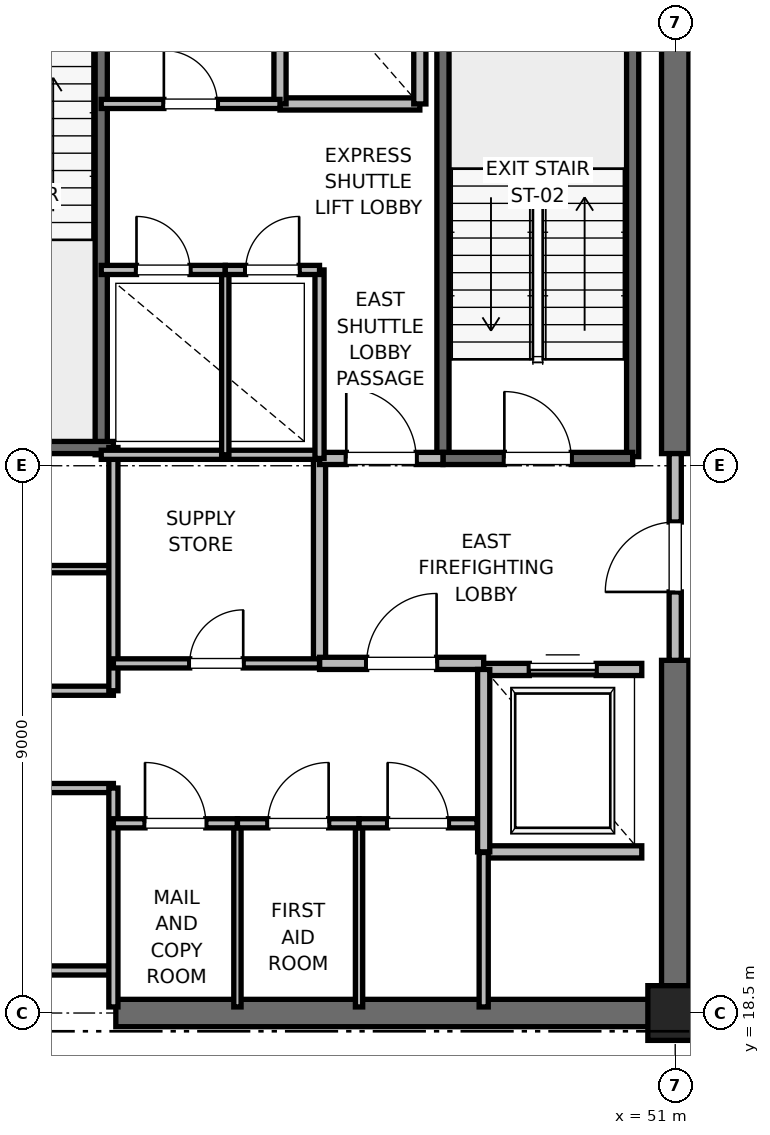
"""IFC4 building model, lengths in metres.
Left out: names, types, materials, properties, quantities, classifications, styles, units other than length and angle.
Written with IfcOpenShell. Run it as: python <this file> out.ifc"""

import sys

from ifc_helpers import new_model, si_unit, direction, frame, frame_2d, origin, origin_2d, place, context, subcontext, project, spatial, rectangle, extrude, element, fill, save


model = new_model("IFC4")
c1 = context("Model", 3, precision=1e-05, world=origin(), true_north=direction((0.0, 1.0)))
c2 = subcontext(c1, "Body", "Model", "MODEL_VIEW")
j1 = project(units=[si_unit("LENGTHUNIT", "METRE"), si_unit("PLANEANGLEUNIT", "RADIAN")], contexts=[c1])
p1 = place(None, origin())
s1 = spatial("IfcSite", under=j1, at=p1, CompositionType="ELEMENT")
p2 = place(p1, origin())
s2 = spatial("IfcBuilding", under=s1, at=p2, CompositionType="ELEMENT")
p3 = place(p2, frame((0.0, 0.0, 283.2)))
s3 = spatial("IfcBuildingStorey", under=s2, at=p3, CompositionType="ELEMENT", Elevation=283.2)
p4 = place(p3, frame((51.0, 18.5, 0.0), z_axis=(0.0, 0.0, 1.0), x_axis=(1.0, 0.0, 0.0)))
e1 = element("IfcColumn", 1, at=p4, inside=s3, PredefinedType="PILASTER", context=c2, shape_type="SweptSolid", body=[
    extrude(rectangle(XDim=0.9, YDim=0.9, at=origin_2d()), origin(), (0.0, 0.0, 1.0), 4.0),
])
p5 = place(p3, frame((41.8, 18.5, 0.0), z_axis=(0.0, 0.0, 1.0), x_axis=(1.0, 0.0, 0.0)))
e2 = element("IfcWall", 2, at=p5, inside=s3, PredefinedType="SHEAR", context=c2, shape_type="SweptSolid", body=[
    extrude(rectangle(XDim=9.2, YDim=0.45, at=frame_2d((4.6, 0.0))), origin(), (0.0, 0.0, 1.0), 3.785),
])
p6 = place(p3, frame((51.0, 18.5, 0.0), z_axis=(0.0, 0.0, 1.0), x_axis=(0.0, 1.0, 0.0)))
e3 = element("IfcWall", 3, at=p6, inside=s3, PredefinedType="SHEAR", context=c2, shape_type="SweptSolid", body=[
    extrude(rectangle(XDim=5.8, YDim=0.45, at=frame_2d((2.9, 0.0))), origin(), (0.0, 0.0, 1.0), 3.785),
])
p7 = place(p3, frame((51.0, 27.7, 0.0), z_axis=(0.0, 0.0, 1.0), x_axis=(0.0, 1.0, 0.0)))
e4 = element("IfcWall", 4, at=p7, inside=s3, PredefinedType="SHEAR", context=c2, shape_type="SweptSolid", body=[
    extrude(rectangle(XDim=8.8, YDim=0.45, at=frame_2d((4.4, 0.0))), origin(), (0.0, 0.0, 1.0), 3.785),
])
p8 = place(p3, frame((50.3, 27.65, 0.0), z_axis=(0.0, 0.0, 1.0), x_axis=(0.0, 1.0, 0.0)))
e5 = element("IfcWall", 5, at=p8, inside=s3, PredefinedType="SOLIDWALL", context=c2, shape_type="SweptSolid", body=[
    extrude(rectangle(XDim=8.15, YDim=0.2, at=frame_2d((4.075, 0.0))), origin(), (0.0, 0.0, 1.0), 3.785),
])
p9 = place(p3, frame((47.18, 27.62, 0.0), z_axis=(0.0, 0.0, 1.0), x_axis=(0.0, 1.0, 0.0)))
e6 = element("IfcWall", 6, at=p9, inside=s3, PredefinedType="SOLIDWALL", context=c2, shape_type="SweptSolid", body=[
    extrude(rectangle(XDim=8.18, YDim=0.2, at=frame_2d((4.09, 0.0))), origin(), (0.0, 0.0, 1.0), 3.785),
])
p10 = place(p3, frame((47.18, 27.62, 0.0), z_axis=(0.0, 0.0, 1.0), x_axis=(1.0, 0.0, 0.0)))
e7 = element("IfcWall", 7, at=p10, inside=s3, PredefinedType="SOLIDWALL", context=c2, shape_type="SweptSolid", body=[
    extrude(rectangle(XDim=3.12, YDim=0.2, at=frame_2d((1.56, 0.0))), origin(), (0.0, 0.0, 1.0), 3.785),
])
p11 = place(p10, frame((1.01, 0.0, 0.0)))
e8 = element("IfcOpeningElement", 8, at=p11, cuts=e7, PredefinedType="OPENING", context=c2, shape_type="SweptSolid", body=[
    extrude(rectangle(XDim=1.1, YDim=2.15, at=frame_2d((0.55, 1.075))), frame((0.0, 0.1, 0.0), z_axis=(0.0, -1.0, 0.0), x_axis=(1.0, 0.0, 0.0)), (0.0, 0.0, 1.0), 0.2),
])
p12 = place(p3, frame((41.56, 27.68, 0.0), z_axis=(0.0, 0.0, 1.0), x_axis=(0.0, 1.0, 0.0)))
e9 = element("IfcWall", 9, at=p12, inside=s3, PredefinedType="SOLIDWALL", context=c2, shape_type="SweptSolid", body=[
    extrude(rectangle(XDim=8.57, YDim=0.2, at=frame_2d((4.285, 0.0))), origin(), (0.0, 0.0, 1.0), 3.785),
])
p13 = place(p3, frame((38.44, 27.8, 0.0), z_axis=(0.0, 0.0, 1.0), x_axis=(1.0, 0.0, 0.0)))
e10 = element("IfcWall", 10, at=p13, inside=s3, PredefinedType="SOLIDWALL", context=c2, shape_type="SweptSolid", body=[
    extrude(rectangle(XDim=3.32, YDim=0.2, at=frame_2d((1.66, 0.0))), origin(), (0.0, 0.0, 1.0), 3.785),
])
p14 = place(p3, frame((45.15, 24.25, 0.0), z_axis=(0.0, 0.0, 1.0), x_axis=(0.0, 1.0, 0.0)))
e11 = element("IfcWall", 11, at=p14, inside=s3, PredefinedType="PARTITIONING", context=c2, shape_type="SweptSolid", body=[
    extrude(rectangle(XDim=3.37, YDim=0.2, at=frame_2d((1.685, 0.0))), origin(), (0.0, 0.0, 1.0), 3.785),
])
p15 = place(p3, frame((45.15, 24.25, 0.0), z_axis=(0.0, 0.0, 1.0), x_axis=(1.0, 0.0, 0.0)))
e12 = element("IfcWall", 12, at=p15, inside=s3, PredefinedType="PARTITIONING", context=c2, shape_type="SweptSolid", body=[
    extrude(rectangle(XDim=2.7, YDim=0.2, at=frame_2d((1.35, 0.0))), origin(), (0.0, 0.0, 1.0), 3.785),
])
p16 = place(p15, frame((0.775, 0.0, 0.0)))
e13 = element("IfcOpeningElement", 13, at=p16, cuts=e12, PredefinedType="OPENING", context=c2, shape_type="SweptSolid", body=[
    extrude(rectangle(XDim=1.15, YDim=2.2, at=frame_2d((0.575, 1.1))), frame((0.0, 0.1, 0.0), z_axis=(0.0, -1.0, 0.0), x_axis=(1.0, 0.0, 0.0)), (0.0, 0.0, 1.0), 0.2),
])
p17 = place(p3, frame((45.15, 27.62, 0.0), z_axis=(0.0, 0.0, 1.0), x_axis=(1.0, 0.0, 0.0)))
e14 = element("IfcWall", 14, at=p17, inside=s3, PredefinedType="PARTITIONING", context=c2, shape_type="SweptSolid", body=[
    extrude(rectangle(XDim=2.03, YDim=0.2, at=frame_2d((1.015, 0.0))), origin(), (0.0, 0.0, 1.0), 3.785),
])
p18 = place(p17, frame((0.44, 0.0, 0.0)))
e15 = element("IfcOpeningElement", 15, at=p18, cuts=e14, PredefinedType="OPENING", context=c2, shape_type="SweptSolid", body=[
    extrude(rectangle(XDim=1.15, YDim=2.2, at=frame_2d((0.575, 1.1))), frame((0.0, 0.1, 0.0), z_axis=(0.0, -1.0, 0.0), x_axis=(1.0, 0.0, 0.0)), (0.0, 0.0, 1.0), 0.2),
])
p19 = place(p3, frame((51.0, 24.3, 0.0), z_axis=(0.0, 0.0, 1.0), x_axis=(0.0, 1.0, 0.0)))
e16 = element("IfcWall", 16, at=p19, inside=s3, PredefinedType="PARTITIONING", context=c2, shape_type="SweptSolid", body=[
    extrude(rectangle(XDim=3.4, YDim=0.2, at=frame_2d((1.7, 0.0))), origin(), (0.0, 0.0, 1.0), 2.865),
])
p20 = place(p19, frame((1.125, 0.0, 0.0)))
e17 = element("IfcOpeningElement", 17, at=p20, cuts=e16, PredefinedType="OPENING", context=c2, shape_type="SweptSolid", body=[
    extrude(rectangle(XDim=1.15, YDim=2.2, at=frame_2d((0.575, 1.1))), frame((0.0, 0.1, 0.0), z_axis=(0.0, -1.0, 0.0), x_axis=(1.0, 0.0, 0.0)), (0.0, 0.0, 1.0), 0.2),
])
p21 = place(p3, frame((47.85, 21.15, 0.0), z_axis=(0.0, 0.0, 1.0), x_axis=(1.0, 0.0, 0.0)))
e18 = element("IfcWall", 18, at=p21, inside=s3, PredefinedType="SOLIDWALL", context=c2, shape_type="SweptSolid", body=[
    extrude(rectangle(XDim=2.6, YDim=0.2, at=frame_2d((1.3, 0.0))), origin(), (0.0, 0.0, 1.0), 3.785),
])
p22 = place(p3, frame((50.45, 24.15, 0.0), z_axis=(0.0, 0.0, 1.0), x_axis=(-1.0, 0.0, 0.0)))
e19 = element("IfcWall", 19, at=p22, inside=s3, PredefinedType="SOLIDWALL", context=c2, shape_type="SweptSolid", body=[
    extrude(rectangle(XDim=2.6, YDim=0.2, at=frame_2d((1.3, 0.0))), origin(), (0.0, 0.0, 1.0), 2.865),
])
p23 = place(p22, frame((0.75, 0.0, 0.0)))
e20 = element("IfcOpeningElement", 20, at=p23, cuts=e19, PredefinedType="OPENING", context=c2, shape_type="SweptSolid", body=[
    extrude(rectangle(XDim=1.1, YDim=2.2, at=frame_2d((0.55, 1.1))), frame((0.0, 0.1, 0.0), z_axis=(0.0, -1.0, 0.0), x_axis=(1.0, 0.0, 0.0)), (0.0, 0.0, 1.0), 0.2),
])
p24 = place(p3, frame((47.85, 24.15, 0.0), z_axis=(0.0, 0.0, 1.0), x_axis=(0.0, -1.0, 0.0)))
e21 = element("IfcWall", 21, at=p24, inside=s3, PredefinedType="SOLIDWALL", context=c2, shape_type="SweptSolid", body=[
    extrude(rectangle(XDim=3.0, YDim=0.2, at=frame_2d((1.5, 0.0))), origin(), (0.0, 0.0, 1.0), 3.785),
])
p25 = place(p3, frame((44.5, 33.45, 0.0), z_axis=(0.0, 0.0, 1.0), x_axis=(1.0, 0.0, 0.0)))
e22 = element("IfcWall", 22, at=p25, inside=s3, PredefinedType="SOLIDWALL", context=c2, shape_type="SweptSolid", body=[
    extrude(rectangle(XDim=2.3, YDim=0.2, at=frame_2d((1.15, 0.0))), origin(), (0.0, 0.0, 1.0), 3.785),
])
p26 = place(p3, frame((44.5, 36.05, 0.0), z_axis=(0.0, 0.0, 1.0), x_axis=(0.0, -1.0, 0.0)))
e23 = element("IfcWall", 23, at=p26, inside=s3, PredefinedType="SOLIDWALL", context=c2, shape_type="SweptSolid", body=[
    extrude(rectangle(XDim=2.6, YDim=0.2, at=frame_2d((1.3, 0.0))), origin(), (0.0, 0.0, 1.0), 2.865),
])
p27 = place(p3, frame((46.8, 33.45, 0.0), z_axis=(0.0, 0.0, 1.0), x_axis=(0.0, 1.0, 0.0)))
e24 = element("IfcWall", 24, at=p27, inside=s3, PredefinedType="SOLIDWALL", context=c2, shape_type="SweptSolid", body=[
    extrude(rectangle(XDim=2.6, YDim=0.2, at=frame_2d((1.3, 0.0))), origin(), (0.0, 0.0, 1.0), 3.785),
])
for number, where, z_axis, x_axis in (
    (25, (39.95, 19.2, 0.0), (0.0, 0.0, 1.0), (1.0, 0.0, 0.0)),
    (26, (39.95, 22.2, 0.0), (0.0, 0.0, 1.0), (1.0, 0.0, 0.0)),
    (27, (39.95, 23.8, 0.0), (0.0, 0.0, 1.0), (1.0, 0.0, 0.0)),
):
    element("IfcWall", number, at=place(p3, frame(where, z_axis=z_axis, x_axis=x_axis)), inside=s3, PredefinedType="PARTITIONING", context=c2, shape_type="SweptSolid", body=[
        extrude(rectangle(XDim=1.81, YDim=0.15, at=frame_2d((0.905, 0.0))), origin(), (0.0, 0.0, 1.0), 2.85),
    ])
p28 = place(p3, frame((39.95, 25.8, 0.0), z_axis=(0.0, 0.0, 1.0), x_axis=(1.0, 0.0, 0.0)))
e28 = element("IfcWall", 28, at=p28, inside=s3, PredefinedType="PARTITIONING", context=c2, shape_type="SweptSolid", body=[
    extrude(rectangle(XDim=1.81, YDim=0.12, at=frame_2d((0.905, 0.0))), origin(), (0.0, 0.0, 1.0), 2.85),
])
p29 = place(p3, frame((41.76, 18.6, 0.0), z_axis=(0.0, 0.0, 1.0), x_axis=(0.0, 1.0, 0.0)))
e29 = element("IfcWall", 29, at=p29, inside=s3, PredefinedType="PARTITIONING", context=c2, shape_type="SweptSolid", body=[
    extrude(rectangle(XDim=3.6, YDim=0.15, at=frame_2d((1.8, 0.0))), origin(), (0.0, 0.0, 1.0), 2.85),
])
p30 = place(p3, frame((41.76, 23.8, 0.0), z_axis=(0.0, 0.0, 1.0), x_axis=(0.0, 1.0, 0.0)))
e30 = element("IfcWall", 30, at=p30, inside=s3, PredefinedType="PARTITIONING", context=c2, shape_type="SweptSolid", body=[
    extrude(rectangle(XDim=4.0, YDim=0.15, at=frame_2d((2.0, 0.0))), origin(), (0.0, 0.0, 1.0), 2.85),
])
p31 = place(p3, frame((41.56, 27.68, 0.0), z_axis=(0.0, 0.0, 1.0), x_axis=(1.0, 0.0, 0.0)))
e31 = element("IfcWall", 31, at=p31, inside=s3, PredefinedType="PARTITIONING", context=c2, shape_type="SweptSolid", body=[
    extrude(rectangle(XDim=3.59, YDim=0.15, at=frame_2d((1.795, 0.0))), origin(), (0.0, 0.0, 1.0), 2.85),
])
p32 = place(p3, frame((47.85, 18.6, 0.0), z_axis=(0.0, 0.0, 1.0), x_axis=(0.0, 1.0, 0.0)))
e32 = element("IfcWall", 32, at=p32, inside=s3, PredefinedType="PARTITIONING", context=c2, shape_type="SweptSolid", body=[
    extrude(rectangle(XDim=2.54, YDim=0.15, at=frame_2d((1.27, 0.0))), origin(), (0.0, 0.0, 1.0), 2.85),
])
for number, where, z_axis, x_axis in (
    (33, (43.8, 18.6, 0.0), (0.0, 0.0, 1.0), (0.0, 1.0, 0.0)),
    (34, (45.8, 18.6, 0.0), (0.0, 0.0, 1.0), (0.0, 1.0, 0.0)),
):
    element("IfcWall", number, at=place(p3, frame(where, z_axis=z_axis, x_axis=x_axis)), inside=s3, PredefinedType="PARTITIONING", context=c2, shape_type="SweptSolid", body=[
        extrude(rectangle(XDim=3.02, YDim=0.12, at=frame_2d((1.51, 0.0))), origin(), (0.0, 0.0, 1.0), 2.85),
    ])
p33 = place(p3, frame((41.76, 21.62, 0.0), z_axis=(0.0, 0.0, 1.0), x_axis=(1.0, 0.0, 0.0)))
e35 = element("IfcWall", 35, at=p33, inside=s3, PredefinedType="PARTITIONING", context=c2, shape_type="SweptSolid", body=[
    extrude(rectangle(XDim=2.04, YDim=0.15, at=frame_2d((1.02, 0.0))), origin(), (0.0, 0.0, 1.0), 2.85),
])
p34 = place(p33, frame((0.52, 0.0, 0.0)))
e36 = element("IfcOpeningElement", 36, at=p34, cuts=e35, PredefinedType="OPENING", context=c2, shape_type="SweptSolid", body=[
    extrude(rectangle(XDim=1.0, YDim=2.15, at=frame_2d((0.5, 1.075))), frame((0.0, 0.075, 0.0), z_axis=(0.0, -1.0, 0.0), x_axis=(1.0, 0.0, 0.0)), (0.0, 0.0, 1.0), 0.15),
])
p35 = place(p3, frame((43.8, 21.62, 0.0), z_axis=(0.0, 0.0, 1.0), x_axis=(1.0, 0.0, 0.0)))
e37 = element("IfcWall", 37, at=p35, inside=s3, PredefinedType="PARTITIONING", context=c2, shape_type="SweptSolid", body=[
    extrude(rectangle(XDim=2.0, YDim=0.15, at=frame_2d((1.0, 0.0))), origin(), (0.0, 0.0, 1.0), 2.85),
])
p36 = place(p35, frame((0.5, 0.0, 0.0)))
e38 = element("IfcOpeningElement", 38, at=p36, cuts=e37, PredefinedType="OPENING", context=c2, shape_type="SweptSolid", body=[
    extrude(rectangle(XDim=1.0, YDim=2.15, at=frame_2d((0.5, 1.075))), frame((0.0, 0.075, 0.0), z_axis=(0.0, -1.0, 0.0), x_axis=(1.0, 0.0, 0.0)), (0.0, 0.0, 1.0), 0.15),
])
p37 = place(p3, frame((45.8, 21.62, 0.0), z_axis=(0.0, 0.0, 1.0), x_axis=(1.0, 0.0, 0.0)))
e39 = element("IfcWall", 39, at=p37, inside=s3, PredefinedType="PARTITIONING", context=c2, shape_type="SweptSolid", body=[
    extrude(rectangle(XDim=1.94, YDim=0.15, at=frame_2d((0.97, 0.0))), origin(), (0.0, 0.0, 1.0), 2.85),
])
p38 = place(p37, frame((0.47, 0.0, 0.0)))
e40 = element("IfcOpeningElement", 40, at=p38, cuts=e39, PredefinedType="OPENING", context=c2, shape_type="SweptSolid", body=[
    extrude(rectangle(XDim=1.0, YDim=2.15, at=frame_2d((0.5, 1.075))), frame((0.0, 0.075, 0.0), z_axis=(0.0, -1.0, 0.0), x_axis=(1.0, 0.0, 0.0)), (0.0, 0.0, 1.0), 0.15),
])
p39 = place(p3, frame((41.76, 24.25, 0.0), z_axis=(0.0, 0.0, 1.0), x_axis=(1.0, 0.0, 0.0)))
e41 = element("IfcWall", 41, at=p39, inside=s3, PredefinedType="PARTITIONING", context=c2, shape_type="SweptSolid", body=[
    extrude(rectangle(XDim=3.39, YDim=0.15, at=frame_2d((1.695, 0.0))), origin(), (0.0, 0.0, 1.0), 2.85),
])
p40 = place(p39, frame((1.255, 0.0, 0.0)))
e42 = element("IfcOpeningElement", 42, at=p40, cuts=e41, PredefinedType="OPENING", context=c2, shape_type="SweptSolid", body=[
    extrude(rectangle(XDim=0.88, YDim=2.1, at=frame_2d((0.44, 1.05))), frame((0.0, 0.075, 0.0), z_axis=(0.0, -1.0, 0.0), x_axis=(1.0, 0.0, 0.0)), (0.0, 0.0, 1.0), 0.15),
])
p41 = place(p3, frame((45.15, 27.62, 0.0), z_axis=(0.0, 0.0, 1.0), x_axis=(0.0, 1.0, 0.0)))
e43 = element("IfcWall", 43, at=p41, inside=s3, PredefinedType="PARTITIONING", context=c2, shape_type="SweptSolid", body=[
    extrude(rectangle(XDim=3.1, YDim=0.15, at=frame_2d((1.55, 0.0))), origin(), (0.0, 0.0, 1.0), 2.85),
])
p42 = place(p3, frame((43.6, 27.68, 0.0), z_axis=(0.0, 0.0, 1.0), x_axis=(0.0, 1.0, 0.0)))
e44 = element("IfcWall", 44, at=p42, inside=s3, PredefinedType="PARTITIONING", context=c2, shape_type="SweptSolid", body=[
    extrude(rectangle(XDim=3.04, YDim=0.12, at=frame_2d((1.52, 0.0))), origin(), (0.0, 0.0, 1.0), 2.85),
])
p43 = place(p3, frame((41.56, 30.72, 0.0), z_axis=(0.0, 0.0, 1.0), x_axis=(1.0, 0.0, 0.0)))
e45 = element("IfcWall", 45, at=p43, inside=s3, PredefinedType="PARTITIONING", context=c2, shape_type="SweptSolid", body=[
    extrude(rectangle(XDim=2.04, YDim=0.15, at=frame_2d((1.02, 0.0))), origin(), (0.0, 0.0, 1.0), 2.85),
])
p44 = place(p43, frame((0.58, 0.0, 0.0)))
e46 = element("IfcOpeningElement", 46, at=p44, cuts=e45, PredefinedType="OPENING", context=c2, shape_type="SweptSolid", body=[
    extrude(rectangle(XDim=0.88, YDim=2.1, at=frame_2d((0.44, 1.05))), frame((0.0, 0.075, 0.0), z_axis=(0.0, -1.0, 0.0), x_axis=(1.0, 0.0, 0.0)), (0.0, 0.0, 1.0), 0.15),
])
p45 = place(p3, frame((43.6, 30.72, 0.0), z_axis=(0.0, 0.0, 1.0), x_axis=(1.0, 0.0, 0.0)))
e47 = element("IfcWall", 47, at=p45, inside=s3, PredefinedType="PARTITIONING", context=c2, shape_type="SweptSolid", body=[
    extrude(rectangle(XDim=1.55, YDim=0.15, at=frame_2d((0.775, 0.0))), origin(), (0.0, 0.0, 1.0), 2.85),
])
p46 = place(p45, frame((0.335, 0.0, 0.0)))
e48 = element("IfcOpeningElement", 48, at=p46, cuts=e47, PredefinedType="OPENING", context=c2, shape_type="SweptSolid", body=[
    extrude(rectangle(XDim=0.88, YDim=2.1, at=frame_2d((0.44, 1.05))), frame((0.0, 0.075, 0.0), z_axis=(0.0, -1.0, 0.0), x_axis=(1.0, 0.0, 0.0)), (0.0, 0.0, 1.0), 0.15),
])
p47 = place(p3, frame((41.56, 33.45, 0.0), z_axis=(0.0, 0.0, 1.0), x_axis=(1.0, 0.0, 0.0)))
e49 = element("IfcWall", 49, at=p47, inside=s3, PredefinedType="PARTITIONING", context=c2, shape_type="SweptSolid", body=[
    extrude(rectangle(XDim=2.94, YDim=0.15, at=frame_2d((1.47, 0.0))), origin(), (0.0, 0.0, 1.0), 2.85),
])
p48 = place(p47, frame((1.03, 0.0, 0.0)))
e50 = element("IfcOpeningElement", 50, at=p48, cuts=e49, PredefinedType="OPENING", context=c2, shape_type="SweptSolid", body=[
    extrude(rectangle(XDim=0.88, YDim=2.1, at=frame_2d((0.44, 1.05))), frame((0.0, 0.075, 0.0), z_axis=(0.0, -1.0, 0.0), x_axis=(1.0, 0.0, 0.0)), (0.0, 0.0, 1.0), 0.15),
])
p49 = place(p11, origin())
e51 = element("IfcDoor", 51, at=p49, inside=s3, OperationType="SINGLE_SWING_LEFT", PredefinedType="DOOR", context=c2, shape_type="SweptSolid", body=[
    extrude(rectangle(XDim=1.1, YDim=2.15, at=frame_2d((0.55, 1.075))), frame((0.0, 0.025, 0.0), z_axis=(0.0, -1.0, 0.0), x_axis=(1.0, 0.0, 0.0)), (0.0, 0.0, 1.0), 0.05),
])
fill(e8, e51)
p50 = place(p16, origin())
e52 = element("IfcDoor", 52, at=p50, inside=s3, OperationType="SINGLE_SWING_RIGHT", PredefinedType="DOOR", context=c2, shape_type="SweptSolid", body=[
    extrude(rectangle(XDim=1.15, YDim=2.2, at=frame_2d((0.575, 1.1))), frame((0.0, 0.025, 0.0), z_axis=(0.0, -1.0, 0.0), x_axis=(1.0, 0.0, 0.0)), (0.0, 0.0, 1.0), 0.05),
])
fill(e13, e52)
p51 = place(p18, origin())
e53 = element("IfcDoor", 53, at=p51, inside=s3, OperationType="SINGLE_SWING_LEFT", PredefinedType="DOOR", context=c2, shape_type="SweptSolid", body=[
    extrude(rectangle(XDim=1.15, YDim=2.2, at=frame_2d((0.575, 1.1))), frame((0.0, 0.025, 0.0), z_axis=(0.0, -1.0, 0.0), x_axis=(1.0, 0.0, 0.0)), (0.0, 0.0, 1.0), 0.05),
])
fill(e15, e53)
p52 = place(p20, origin())
e54 = element("IfcDoor", 54, at=p52, inside=s3, OperationType="SINGLE_SWING_LEFT", PredefinedType="DOOR", context=c2, shape_type="SweptSolid", body=[
    extrude(rectangle(XDim=1.15, YDim=2.2, at=frame_2d((0.575, 1.1))), frame((0.0, 0.025, 0.0), z_axis=(0.0, -1.0, 0.0), x_axis=(1.0, 0.0, 0.0)), (0.0, 0.0, 1.0), 0.05),
])
fill(e17, e54)
p53 = place(p23, origin())
e55 = element("IfcDoor", 55, at=p53, inside=s3, OperationType="SLIDING_TO_RIGHT", PredefinedType="DOOR", context=c2, shape_type="SweptSolid", body=[
    extrude(rectangle(XDim=1.1, YDim=2.2, at=frame_2d((0.55, 1.1))), frame((0.0, 0.025, 0.0), z_axis=(0.0, -1.0, 0.0), x_axis=(1.0, 0.0, 0.0)), (0.0, 0.0, 1.0), 0.05),
])
fill(e20, e55)
p54 = place(p34, origin())
e56 = element("IfcDoor", 56, at=p54, inside=s3, OperationType="SINGLE_SWING_LEFT", PredefinedType="DOOR", context=c2, shape_type="SweptSolid", body=[
    extrude(rectangle(XDim=1.0, YDim=2.15, at=frame_2d((0.5, 1.075))), frame((0.0, 0.025, 0.0), z_axis=(0.0, -1.0, 0.0), x_axis=(1.0, 0.0, 0.0)), (0.0, 0.0, 1.0), 0.05),
])
fill(e36, e56)
p55 = place(p36, origin())
e57 = element("IfcDoor", 57, at=p55, inside=s3, OperationType="SINGLE_SWING_RIGHT", PredefinedType="DOOR", context=c2, shape_type="SweptSolid", body=[
    extrude(rectangle(XDim=1.0, YDim=2.15, at=frame_2d((0.5, 1.075))), frame((0.0, 0.025, 0.0), z_axis=(0.0, -1.0, 0.0), x_axis=(1.0, 0.0, 0.0)), (0.0, 0.0, 1.0), 0.05),
])
fill(e38, e57)
p56 = place(p38, origin())
e58 = element("IfcDoor", 58, at=p56, inside=s3, OperationType="SINGLE_SWING_LEFT", PredefinedType="DOOR", context=c2, shape_type="SweptSolid", body=[
    extrude(rectangle(XDim=1.0, YDim=2.15, at=frame_2d((0.5, 1.075))), frame((0.0, 0.025, 0.0), z_axis=(0.0, -1.0, 0.0), x_axis=(1.0, 0.0, 0.0)), (0.0, 0.0, 1.0), 0.05),
])
fill(e40, e58)
p57 = place(p40, origin())
e59 = element("IfcDoor", 59, at=p57, inside=s3, OperationType="SINGLE_SWING_RIGHT", PredefinedType="DOOR", context=c2, shape_type="SweptSolid", body=[
    extrude(rectangle(XDim=0.88, YDim=2.1, at=frame_2d((0.44, 1.05))), frame((0.0, 0.025, 0.0), z_axis=(0.0, -1.0, 0.0), x_axis=(1.0, 0.0, 0.0)), (0.0, 0.0, 1.0), 0.05),
])
fill(e42, e59)
p58 = place(p44, origin())
e60 = element("IfcDoor", 60, at=p58, inside=s3, OperationType="SINGLE_SWING_LEFT", PredefinedType="DOOR", context=c2, shape_type="SweptSolid", body=[
    extrude(rectangle(XDim=0.88, YDim=2.1, at=frame_2d((0.44, 1.05))), frame((0.0, 0.025, 0.0), z_axis=(0.0, -1.0, 0.0), x_axis=(1.0, 0.0, 0.0)), (0.0, 0.0, 1.0), 0.05),
])
fill(e46, e60)
p59 = place(p46, origin())
e61 = element("IfcDoor", 61, at=p59, inside=s3, OperationType="SINGLE_SWING_RIGHT", PredefinedType="DOOR", context=c2, shape_type="SweptSolid", body=[
    extrude(rectangle(XDim=0.88, YDim=2.1, at=frame_2d((0.44, 1.05))), frame((0.0, 0.025, 0.0), z_axis=(0.0, -1.0, 0.0), x_axis=(1.0, 0.0, 0.0)), (0.0, 0.0, 1.0), 0.05),
])
fill(e48, e61)
p60 = place(p48, origin())
e62 = element("IfcDoor", 62, at=p60, inside=s3, OperationType="SINGLE_SWING_LEFT", PredefinedType="DOOR", context=c2, shape_type="SweptSolid", body=[
    extrude(rectangle(XDim=0.88, YDim=2.1, at=frame_2d((0.44, 1.05))), frame((0.0, 0.025, 0.0), z_axis=(0.0, -1.0, 0.0), x_axis=(1.0, 0.0, 0.0)), (0.0, 0.0, 1.0), 0.05),
])
fill(e50, e62)
save(model, sys.argv[1])
